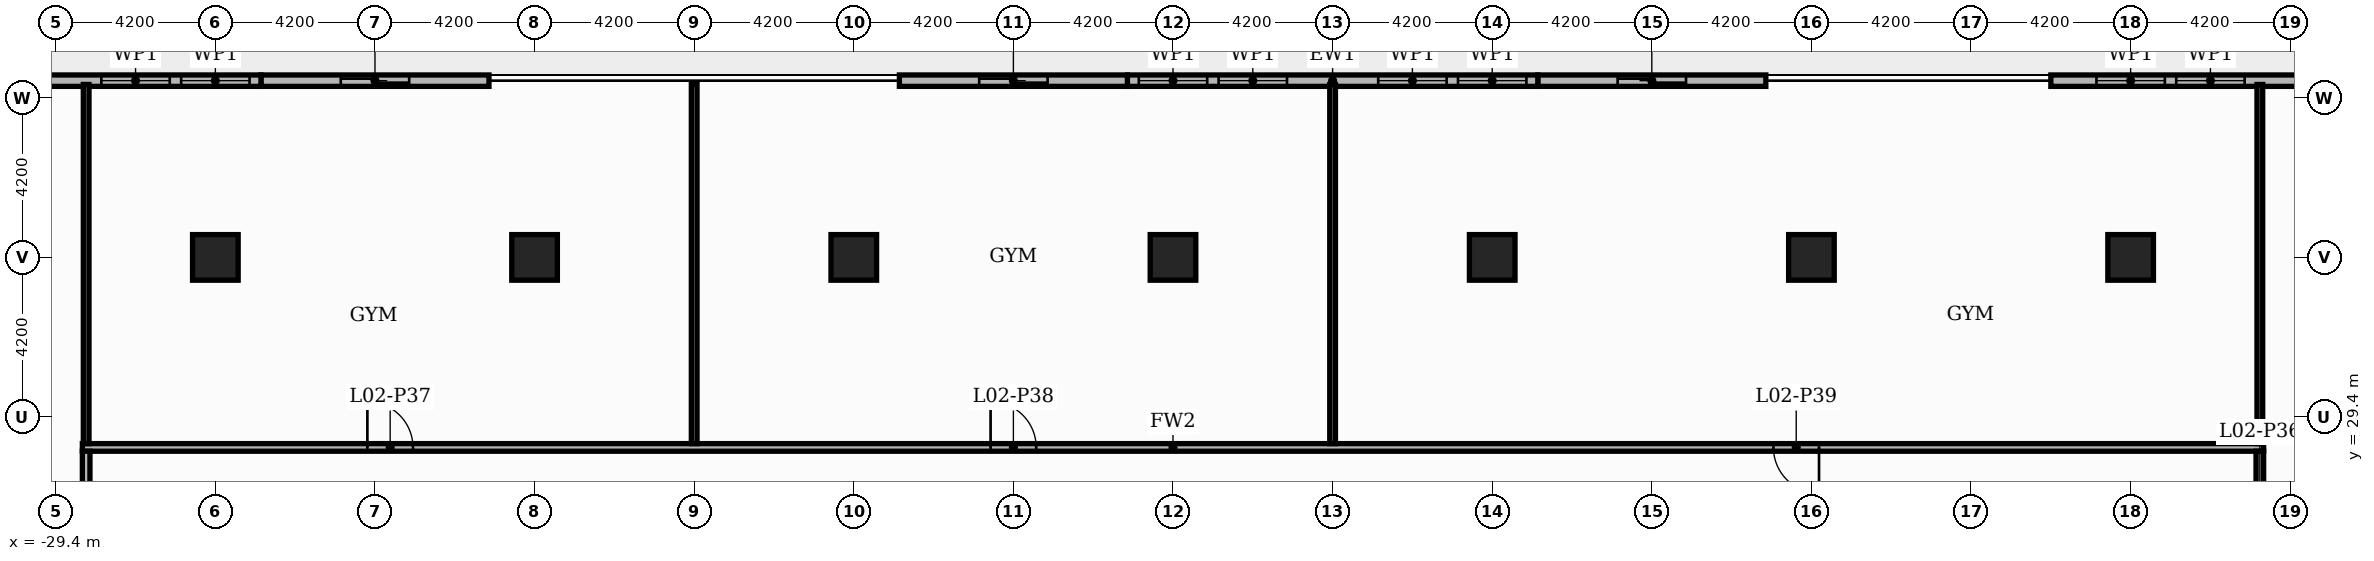
"""IFC4 building model, lengths in metres.
Left out: names, types, materials, properties, quantities, classifications, styles, units other than length and angle.
Written with IfcOpenShell. Run it as: python <this file> out.ifc"""

import sys

from ifc_helpers import new_model, si_unit, direction, frame, frame_2d, origin, origin_2d, place, context, subcontext, project, spatial, rectangle, extrude, element, fill, save


model = new_model("IFC4")
c1 = context("Model", 3, precision=1e-05, world=origin(), true_north=direction((0.0, 1.0)))
c2 = subcontext(c1, "Body", "Model", "MODEL_VIEW")
j1 = project(units=[si_unit("LENGTHUNIT", "METRE"), si_unit("PLANEANGLEUNIT", "RADIAN")], contexts=[c1])
p1 = place(None, origin())
s1 = spatial("IfcSite", under=j1, at=p1, CompositionType="ELEMENT")
p2 = place(p1, origin())
s2 = spatial("IfcBuilding", under=s1, at=p2, CompositionType="ELEMENT")
p3 = place(p2, frame((0.0, 0.0, 12.0)))
s3 = spatial("IfcBuildingStorey", under=s2, at=p3, CompositionType="ELEMENT", Elevation=12.0)
for number, where, z_axis, x_axis in (
    (1, (0.0, 33.6, 0.0), (0.0, 0.0, 1.0), (1.0, 0.0, 0.0)),
    (2, (8.4, 33.6, 0.0), (0.0, 0.0, 1.0), (1.0, 0.0, 0.0)),
    (3, (16.8, 33.6, 0.0), (0.0, 0.0, 1.0), (1.0, 0.0, 0.0)),
    (4, (25.2, 33.6, 0.0), (0.0, 0.0, 1.0), (1.0, 0.0, 0.0)),
    (5, (-8.4, 33.6, 0.0), (0.0, 0.0, 1.0), (1.0, 0.0, 0.0)),
    (6, (-16.8, 33.6, 0.0), (0.0, 0.0, 1.0), (1.0, 0.0, 0.0)),
    (7, (-25.2, 33.6, 0.0), (0.0, 0.0, 1.0), (1.0, 0.0, 0.0)),
):
    element("IfcColumn", number, at=place(p3, frame(where, z_axis=z_axis, x_axis=x_axis)), inside=s3, PredefinedType="COLUMN", context=c2, shape_type="SweptSolid", body=[
        extrude(rectangle(XDim=1.2, YDim=1.2, at=origin_2d()), origin(), (0.0, 0.0, 1.0), 4.8),
    ])
p4 = place(p3, frame((30.6, 38.25, 0.0), z_axis=(0.0, 0.0, 1.0), x_axis=(-1.0, 0.0, 0.0)))
e8 = element("IfcWall", 8, at=p4, inside=s3, PredefinedType="STANDARD", context=c2, shape_type="SweptSolid", body=[
    extrude(rectangle(XDim=7.5, YDim=0.3, at=frame_2d((3.75, 0.0))), origin(), (0.0, 0.0, 1.0), 4.38),
])
p5 = place(p4, frame((2.4, 0.0, 0.6)))
e9 = element("IfcOpeningElement", 9, at=p5, cuts=e8, PredefinedType="OPENING", context=c2, shape_type="SweptSolid", body=[
    extrude(rectangle(XDim=1.8, YDim=3.0, at=frame_2d((0.9, 1.5))), frame((0.0, 0.16, 0.0), z_axis=(0.0, -1.0, 0.0), x_axis=(1.0, 0.0, 0.0)), (0.0, 0.0, 1.0), 0.32),
])
p6 = place(p4, frame((4.5, 0.0, 0.6)))
e10 = element("IfcOpeningElement", 10, at=p6, cuts=e8, PredefinedType="OPENING", context=c2, shape_type="SweptSolid", body=[
    extrude(rectangle(XDim=1.8, YDim=3.0, at=frame_2d((0.9, 1.5))), frame((0.0, 0.16, 0.0), z_axis=(0.0, -1.0, 0.0), x_axis=(1.0, 0.0, 0.0)), (0.0, 0.0, 1.0), 0.32),
])
p7 = place(p3, frame((15.6, 38.25, 0.0), z_axis=(0.0, 0.0, 1.0), x_axis=(-1.0, 0.0, 0.0)))
e11 = element("IfcWall", 11, at=p7, inside=s3, PredefinedType="STANDARD", context=c2, shape_type="SweptSolid", body=[
    extrude(rectangle(XDim=6.0, YDim=0.3, at=frame_2d((3.0, 0.0))), origin(), (0.0, 0.0, 1.0), 4.38),
])
p8 = place(p7, frame((2.1, 0.0, 0.0)))
e12 = element("IfcOpeningElement", 12, at=p8, cuts=e11, PredefinedType="OPENING", context=c2, shape_type="SweptSolid", body=[
    extrude(rectangle(XDim=1.8, YDim=2.4, at=frame_2d((0.9, 1.2))), frame((0.0, 0.16, 0.0), z_axis=(0.0, -1.0, 0.0), x_axis=(1.0, 0.0, 0.0)), (0.0, 0.0, 1.0), 0.32),
])
p9 = place(p3, frame((9.6, 38.25, 0.0), z_axis=(0.0, 0.0, 1.0), x_axis=(-1.0, 0.0, 0.0)))
e13 = element("IfcWall", 13, at=p9, inside=s3, PredefinedType="STANDARD", context=c2, shape_type="SweptSolid", body=[
    extrude(rectangle(XDim=10.8, YDim=0.3, at=frame_2d((5.4, 0.0))), origin(), (0.0, 0.0, 1.0), 4.38),
])
p10 = place(p9, frame((0.3, 0.0, 0.6)))
e14 = element("IfcOpeningElement", 14, at=p10, cuts=e13, PredefinedType="OPENING", context=c2, shape_type="SweptSolid", body=[
    extrude(rectangle(XDim=1.8, YDim=3.0, at=frame_2d((0.9, 1.5))), frame((0.0, 0.16, 0.0), z_axis=(0.0, -1.0, 0.0), x_axis=(1.0, 0.0, 0.0)), (0.0, 0.0, 1.0), 0.32),
])
p11 = place(p9, frame((2.4, 0.0, 0.6)))
e15 = element("IfcOpeningElement", 15, at=p11, cuts=e13, PredefinedType="OPENING", context=c2, shape_type="SweptSolid", body=[
    extrude(rectangle(XDim=1.8, YDim=3.0, at=frame_2d((0.9, 1.5))), frame((0.0, 0.16, 0.0), z_axis=(0.0, -1.0, 0.0), x_axis=(1.0, 0.0, 0.0)), (0.0, 0.0, 1.0), 0.32),
])
p12 = place(p9, frame((6.6, 0.0, 0.6)))
e16 = element("IfcOpeningElement", 16, at=p12, cuts=e13, PredefinedType="OPENING", context=c2, shape_type="SweptSolid", body=[
    extrude(rectangle(XDim=1.8, YDim=3.0, at=frame_2d((0.9, 1.5))), frame((0.0, 0.16, 0.0), z_axis=(0.0, -1.0, 0.0), x_axis=(1.0, 0.0, 0.0)), (0.0, 0.0, 1.0), 0.32),
])
p13 = place(p9, frame((8.7, 0.0, 0.6)))
e17 = element("IfcOpeningElement", 17, at=p13, cuts=e13, PredefinedType="OPENING", context=c2, shape_type="SweptSolid", body=[
    extrude(rectangle(XDim=1.8, YDim=3.0, at=frame_2d((0.9, 1.5))), frame((0.0, 0.16, 0.0), z_axis=(0.0, -1.0, 0.0), x_axis=(1.0, 0.0, 0.0)), (0.0, 0.0, 1.0), 0.32),
])
p14 = place(p3, frame((-1.2, 38.25, 0.0), z_axis=(0.0, 0.0, 1.0), x_axis=(-1.0, 0.0, 0.0)))
e18 = element("IfcWall", 18, at=p14, inside=s3, PredefinedType="STANDARD", context=c2, shape_type="SweptSolid", body=[
    extrude(rectangle(XDim=6.0, YDim=0.3, at=frame_2d((3.0, 0.0))), origin(), (0.0, 0.0, 1.0), 4.38),
])
p15 = place(p14, frame((2.1, 0.0, 0.0)))
e19 = element("IfcOpeningElement", 19, at=p15, cuts=e18, PredefinedType="OPENING", context=c2, shape_type="SweptSolid", body=[
    extrude(rectangle(XDim=1.8, YDim=2.4, at=frame_2d((0.9, 1.2))), frame((0.0, 0.16, 0.0), z_axis=(0.0, -1.0, 0.0), x_axis=(1.0, 0.0, 0.0)), (0.0, 0.0, 1.0), 0.32),
])
p16 = place(p3, frame((-18.0, 38.25, 0.0), z_axis=(0.0, 0.0, 1.0), x_axis=(-1.0, 0.0, 0.0)))
e20 = element("IfcWall", 20, at=p16, inside=s3, PredefinedType="STANDARD", context=c2, shape_type="SweptSolid", body=[
    extrude(rectangle(XDim=6.0, YDim=0.3, at=frame_2d((3.0, 0.0))), origin(), (0.0, 0.0, 1.0), 4.38),
])
p17 = place(p16, frame((2.1, 0.0, 0.0)))
e21 = element("IfcOpeningElement", 21, at=p17, cuts=e20, PredefinedType="OPENING", context=c2, shape_type="SweptSolid", body=[
    extrude(rectangle(XDim=1.8, YDim=2.4, at=frame_2d((0.9, 1.2))), frame((0.0, 0.16, 0.0), z_axis=(0.0, -1.0, 0.0), x_axis=(1.0, 0.0, 0.0)), (0.0, 0.0, 1.0), 0.32),
])
p18 = place(p3, frame((-24.0, 38.25, 0.0), z_axis=(0.0, 0.0, 1.0), x_axis=(-1.0, 0.0, 0.0)))
e22 = element("IfcWall", 22, at=p18, inside=s3, PredefinedType="STANDARD", context=c2, shape_type="SweptSolid", body=[
    extrude(rectangle(XDim=7.2, YDim=0.3, at=frame_2d((3.6, 0.0))), origin(), (0.0, 0.0, 1.0), 4.38),
])
p19 = place(p18, frame((0.3, 0.0, 0.6)))
e23 = element("IfcOpeningElement", 23, at=p19, cuts=e22, PredefinedType="OPENING", context=c2, shape_type="SweptSolid", body=[
    extrude(rectangle(XDim=1.8, YDim=3.0, at=frame_2d((0.9, 1.5))), frame((0.0, 0.16, 0.0), z_axis=(0.0, -1.0, 0.0), x_axis=(1.0, 0.0, 0.0)), (0.0, 0.0, 1.0), 0.32),
])
p20 = place(p18, frame((2.4, 0.0, 0.6)))
e24 = element("IfcOpeningElement", 24, at=p20, cuts=e22, PredefinedType="OPENING", context=c2, shape_type="SweptSolid", body=[
    extrude(rectangle(XDim=1.8, YDim=3.0, at=frame_2d((0.9, 1.5))), frame((0.0, 0.16, 0.0), z_axis=(0.0, -1.0, 0.0), x_axis=(1.0, 0.0, 0.0)), (0.0, 0.0, 1.0), 0.32),
])
p21 = place(p3, frame((-28.7, 28.6, 0.0), z_axis=(0.0, 0.0, 1.0), x_axis=(1.0, 0.0, 0.0)))
e25 = element("IfcWall", 25, at=p21, inside=s3, PredefinedType="PARTITIONING", context=c2, shape_type="SweptSolid", body=[
    extrude(rectangle(XDim=57.4, YDim=0.2, at=frame_2d((28.7, 0.0))), origin(), (0.0, 0.0, 1.0), 4.08),
])
p22 = place(p21, frame((7.5, 0.0, 0.0)))
e26 = element("IfcOpeningElement", 26, at=p22, cuts=e25, PredefinedType="OPENING", context=c2, shape_type="SweptSolid", body=[
    extrude(rectangle(XDim=1.2, YDim=2.2, at=frame_2d((0.6, 1.1))), frame((0.0, 0.11, 0.0), z_axis=(0.0, -1.0, 0.0), x_axis=(1.0, 0.0, 0.0)), (0.0, 0.0, 1.0), 0.22),
])
p23 = place(p21, frame((23.9, 0.0, 0.0)))
e27 = element("IfcOpeningElement", 27, at=p23, cuts=e25, PredefinedType="OPENING", context=c2, shape_type="SweptSolid", body=[
    extrude(rectangle(XDim=1.2, YDim=2.2, at=frame_2d((0.6, 1.1))), frame((0.0, 0.11, 0.0), z_axis=(0.0, -1.0, 0.0), x_axis=(1.0, 0.0, 0.0)), (0.0, 0.0, 1.0), 0.22),
])
p24 = place(p21, frame((44.5, 0.0, 0.0)))
e28 = element("IfcOpeningElement", 28, at=p24, cuts=e25, PredefinedType="OPENING", context=c2, shape_type="SweptSolid", body=[
    extrude(rectangle(XDim=1.2, YDim=2.2, at=frame_2d((0.6, 1.1))), frame((0.0, 0.11, 0.0), z_axis=(0.0, -1.0, 0.0), x_axis=(1.0, 0.0, 0.0)), (0.0, 0.0, 1.0), 0.22),
])
p25 = place(p3, frame((-28.6, -28.5, 0.0), z_axis=(0.0, 0.0, 1.0), x_axis=(0.0, 1.0, 0.0)))
e29 = element("IfcWall", 29, at=p25, inside=s3, PredefinedType="PARTITIONING", context=c2, shape_type="SweptSolid", body=[
    extrude(rectangle(XDim=57.0, YDim=0.2, at=frame_2d((28.5, 0.0))), origin(), (0.0, 0.0, 1.0), 4.18),
])
p26 = place(p25, frame((9.4, 0.0, 0.0)))
e30 = element("IfcOpeningElement", 30, at=p26, cuts=e29, PredefinedType="OPENING", context=c2, shape_type="SweptSolid", body=[
    extrude(rectangle(XDim=1.2, YDim=2.2, at=frame_2d((0.6, 1.1))), frame((0.0, 0.11, 0.0), z_axis=(0.0, -1.0, 0.0), x_axis=(1.0, 0.0, 0.0)), (0.0, 0.0, 1.0), 0.22),
])
p27 = place(p25, frame((27.9, 0.0, 0.0)))
e31 = element("IfcOpeningElement", 31, at=p27, cuts=e29, PredefinedType="OPENING", context=c2, shape_type="SweptSolid", body=[
    extrude(rectangle(XDim=1.2, YDim=2.2, at=frame_2d((0.6, 1.1))), frame((0.0, 0.11, 0.0), z_axis=(0.0, -1.0, 0.0), x_axis=(1.0, 0.0, 0.0)), (0.0, 0.0, 1.0), 0.22),
])
p28 = place(p25, frame((46.4, 0.0, 0.0)))
e32 = element("IfcOpeningElement", 32, at=p28, cuts=e29, PredefinedType="OPENING", context=c2, shape_type="SweptSolid", body=[
    extrude(rectangle(XDim=1.2, YDim=2.2, at=frame_2d((0.6, 1.1))), frame((0.0, 0.11, 0.0), z_axis=(0.0, -1.0, 0.0), x_axis=(1.0, 0.0, 0.0)), (0.0, 0.0, 1.0), 0.22),
])
for number, where, z_axis, x_axis in (
    (33, (-28.6, 28.7, 0.0), (0.0, 0.0, 1.0), (0.0, 1.0, 0.0)),
    (34, (-12.6, 28.7, 0.0), (0.0, 0.0, 1.0), (0.0, 1.0, 0.0)),
    (35, (4.2, 28.7, 0.0), (0.0, 0.0, 1.0), (0.0, 1.0, 0.0)),
):
    element("IfcWall", number, at=place(p3, frame(where, z_axis=z_axis, x_axis=x_axis)), inside=s3, PredefinedType="PARTITIONING", context=c2, shape_type="SweptSolid", body=[
        extrude(rectangle(XDim=9.45, YDim=0.15, at=frame_2d((4.725, 0.0))), origin(), (0.0, 0.0, 1.0), 4.18),
    ])
p29 = place(p3, frame((28.6, -28.5, 0.0), z_axis=(0.0, 0.0, 1.0), x_axis=(0.0, 1.0, 0.0)))
e36 = element("IfcWall", 36, at=p29, inside=s3, PredefinedType="PARTITIONING", context=c2, shape_type="SweptSolid", body=[
    extrude(rectangle(XDim=57.0, YDim=0.2, at=frame_2d((28.5, 0.0))), origin(), (0.0, 0.0, 1.0), 4.18),
])
p30 = place(p29, frame((7.3, 0.0, 0.0)))
e37 = element("IfcOpeningElement", 37, at=p30, cuts=e36, PredefinedType="OPENING", context=c2, shape_type="SweptSolid", body=[
    extrude(rectangle(XDim=1.2, YDim=2.2, at=frame_2d((0.6, 1.1))), frame((0.0, 0.11, 0.0), z_axis=(0.0, -1.0, 0.0), x_axis=(1.0, 0.0, 0.0)), (0.0, 0.0, 1.0), 0.22),
])
p31 = place(p29, frame((21.6, 0.0, 0.0)))
e38 = element("IfcOpeningElement", 38, at=p31, cuts=e36, PredefinedType="OPENING", context=c2, shape_type="SweptSolid", body=[
    extrude(rectangle(XDim=1.2, YDim=2.2, at=frame_2d((0.6, 1.1))), frame((0.0, 0.11, 0.0), z_axis=(0.0, -1.0, 0.0), x_axis=(1.0, 0.0, 0.0)), (0.0, 0.0, 1.0), 0.22),
])
p32 = place(p29, frame((34.2, 0.0, 0.0)))
e39 = element("IfcOpeningElement", 39, at=p32, cuts=e36, PredefinedType="OPENING", context=c2, shape_type="SweptSolid", body=[
    extrude(rectangle(XDim=1.2, YDim=2.2, at=frame_2d((0.6, 1.1))), frame((0.0, 0.11, 0.0), z_axis=(0.0, -1.0, 0.0), x_axis=(1.0, 0.0, 0.0)), (0.0, 0.0, 1.0), 0.22),
])
p33 = place(p29, frame((46.8, 0.0, 0.0)))
e40 = element("IfcOpeningElement", 40, at=p33, cuts=e36, PredefinedType="OPENING", context=c2, shape_type="SweptSolid", body=[
    extrude(rectangle(XDim=1.2, YDim=2.2, at=frame_2d((0.6, 1.1))), frame((0.0, 0.11, 0.0), z_axis=(0.0, -1.0, 0.0), x_axis=(1.0, 0.0, 0.0)), (0.0, 0.0, 1.0), 0.22),
])
p34 = place(p29, frame((54.8, 0.0, 0.0)))
e41 = element("IfcOpeningElement", 41, at=p34, cuts=e36, PredefinedType="OPENING", context=c2, shape_type="SweptSolid", body=[
    extrude(rectangle(XDim=1.2, YDim=2.2, at=frame_2d((0.6, 1.1))), frame((0.0, 0.11, 0.0), z_axis=(0.0, -1.0, 0.0), x_axis=(1.0, 0.0, 0.0)), (0.0, 0.0, 1.0), 0.22),
])
p35 = place(p3, frame((28.6, 28.7, 0.0), z_axis=(0.0, 0.0, 1.0), x_axis=(0.0, 1.0, 0.0)))
e42 = element("IfcWall", 42, at=p35, inside=s3, PredefinedType="PARTITIONING", context=c2, shape_type="SweptSolid", body=[
    extrude(rectangle(XDim=9.45, YDim=0.15, at=frame_2d((4.725, 0.0))), origin(), (0.0, 0.0, 1.0), 4.18),
])
p36 = place(p5, origin())
e43 = element("IfcWindow", 43, at=p36, inside=s3, PartitioningType="SINGLE_PANEL", PredefinedType="WINDOW", context=c2, shape_type="SweptSolid", body=[
    extrude(rectangle(XDim=1.8, YDim=3.0, at=frame_2d((0.9, 1.5))), frame((0.0, 0.03, 0.0), z_axis=(0.0, -1.0, 0.0), x_axis=(1.0, 0.0, 0.0)), (0.0, 0.0, 1.0), 0.06),
])
fill(e9, e43)
p37 = place(p6, origin())
e44 = element("IfcWindow", 44, at=p37, inside=s3, PartitioningType="SINGLE_PANEL", PredefinedType="WINDOW", context=c2, shape_type="SweptSolid", body=[
    extrude(rectangle(XDim=1.8, YDim=3.0, at=frame_2d((0.9, 1.5))), frame((0.0, 0.03, 0.0), z_axis=(0.0, -1.0, 0.0), x_axis=(1.0, 0.0, 0.0)), (0.0, 0.0, 1.0), 0.06),
])
fill(e10, e44)
p38 = place(p8, origin())
e45 = element("IfcDoor", 45, at=p38, inside=s3, OperationType="SLIDING_TO_RIGHT", PredefinedType="DOOR", context=c2, shape_type="SweptSolid", body=[
    extrude(rectangle(XDim=1.8, YDim=2.4, at=frame_2d((0.9, 1.2))), frame((0.0, 0.025, 0.0), z_axis=(0.0, -1.0, 0.0), x_axis=(1.0, 0.0, 0.0)), (0.0, 0.0, 1.0), 0.05),
])
fill(e12, e45)
p39 = place(p10, origin())
e46 = element("IfcWindow", 46, at=p39, inside=s3, PartitioningType="SINGLE_PANEL", PredefinedType="WINDOW", context=c2, shape_type="SweptSolid", body=[
    extrude(rectangle(XDim=1.8, YDim=3.0, at=frame_2d((0.9, 1.5))), frame((0.0, 0.03, 0.0), z_axis=(0.0, -1.0, 0.0), x_axis=(1.0, 0.0, 0.0)), (0.0, 0.0, 1.0), 0.06),
])
fill(e14, e46)
p40 = place(p11, origin())
e47 = element("IfcWindow", 47, at=p40, inside=s3, PartitioningType="SINGLE_PANEL", PredefinedType="WINDOW", context=c2, shape_type="SweptSolid", body=[
    extrude(rectangle(XDim=1.8, YDim=3.0, at=frame_2d((0.9, 1.5))), frame((0.0, 0.03, 0.0), z_axis=(0.0, -1.0, 0.0), x_axis=(1.0, 0.0, 0.0)), (0.0, 0.0, 1.0), 0.06),
])
fill(e15, e47)
p41 = place(p12, origin())
e48 = element("IfcWindow", 48, at=p41, inside=s3, PartitioningType="SINGLE_PANEL", PredefinedType="WINDOW", context=c2, shape_type="SweptSolid", body=[
    extrude(rectangle(XDim=1.8, YDim=3.0, at=frame_2d((0.9, 1.5))), frame((0.0, 0.03, 0.0), z_axis=(0.0, -1.0, 0.0), x_axis=(1.0, 0.0, 0.0)), (0.0, 0.0, 1.0), 0.06),
])
fill(e16, e48)
p42 = place(p13, origin())
e49 = element("IfcWindow", 49, at=p42, inside=s3, PartitioningType="SINGLE_PANEL", PredefinedType="WINDOW", context=c2, shape_type="SweptSolid", body=[
    extrude(rectangle(XDim=1.8, YDim=3.0, at=frame_2d((0.9, 1.5))), frame((0.0, 0.03, 0.0), z_axis=(0.0, -1.0, 0.0), x_axis=(1.0, 0.0, 0.0)), (0.0, 0.0, 1.0), 0.06),
])
fill(e17, e49)
p43 = place(p15, origin())
e50 = element("IfcDoor", 50, at=p43, inside=s3, OperationType="SLIDING_TO_LEFT", PredefinedType="DOOR", context=c2, shape_type="SweptSolid", body=[
    extrude(rectangle(XDim=1.8, YDim=2.4, at=frame_2d((0.9, 1.2))), frame((0.0, 0.025, 0.0), z_axis=(0.0, -1.0, 0.0), x_axis=(1.0, 0.0, 0.0)), (0.0, 0.0, 1.0), 0.05),
])
fill(e19, e50)
p44 = place(p17, origin())
e51 = element("IfcDoor", 51, at=p44, inside=s3, OperationType="SLIDING_TO_LEFT", PredefinedType="DOOR", context=c2, shape_type="SweptSolid", body=[
    extrude(rectangle(XDim=1.8, YDim=2.4, at=frame_2d((0.9, 1.2))), frame((0.0, 0.025, 0.0), z_axis=(0.0, -1.0, 0.0), x_axis=(1.0, 0.0, 0.0)), (0.0, 0.0, 1.0), 0.05),
])
fill(e21, e51)
p45 = place(p19, origin())
e52 = element("IfcWindow", 52, at=p45, inside=s3, PartitioningType="SINGLE_PANEL", PredefinedType="WINDOW", context=c2, shape_type="SweptSolid", body=[
    extrude(rectangle(XDim=1.8, YDim=3.0, at=frame_2d((0.9, 1.5))), frame((0.0, 0.03, 0.0), z_axis=(0.0, -1.0, 0.0), x_axis=(1.0, 0.0, 0.0)), (0.0, 0.0, 1.0), 0.06),
])
fill(e23, e52)
p46 = place(p20, origin())
e53 = element("IfcWindow", 53, at=p46, inside=s3, PartitioningType="SINGLE_PANEL", PredefinedType="WINDOW", context=c2, shape_type="SweptSolid", body=[
    extrude(rectangle(XDim=1.8, YDim=3.0, at=frame_2d((0.9, 1.5))), frame((0.0, 0.03, 0.0), z_axis=(0.0, -1.0, 0.0), x_axis=(1.0, 0.0, 0.0)), (0.0, 0.0, 1.0), 0.06),
])
fill(e24, e53)
p47 = place(p22, origin())
e54 = element("IfcDoor", 54, at=p47, inside=s3, OperationType="SINGLE_SWING_LEFT", PredefinedType="DOOR", context=c2, shape_type="SweptSolid", body=[
    extrude(rectangle(XDim=1.2, YDim=2.2, at=frame_2d((0.6, 1.1))), frame((0.0, 0.025, 0.0), z_axis=(0.0, -1.0, 0.0), x_axis=(1.0, 0.0, 0.0)), (0.0, 0.0, 1.0), 0.05),
])
fill(e26, e54)
p48 = place(p23, origin())
e55 = element("IfcDoor", 55, at=p48, inside=s3, OperationType="SINGLE_SWING_LEFT", PredefinedType="DOOR", context=c2, shape_type="SweptSolid", body=[
    extrude(rectangle(XDim=1.2, YDim=2.2, at=frame_2d((0.6, 1.1))), frame((0.0, 0.025, 0.0), z_axis=(0.0, -1.0, 0.0), x_axis=(1.0, 0.0, 0.0)), (0.0, 0.0, 1.0), 0.05),
])
fill(e27, e55)
p49 = place(p24, origin())
e56 = element("IfcDoor", 56, at=p49, inside=s3, OperationType="SINGLE_SWING_RIGHT", PredefinedType="DOOR", context=c2, shape_type="SweptSolid", body=[
    extrude(rectangle(XDim=1.2, YDim=2.2, at=frame_2d((0.6, 1.1))), frame((0.0, 0.025, 0.0), z_axis=(0.0, -1.0, 0.0), x_axis=(1.0, 0.0, 0.0)), (0.0, 0.0, 1.0), 0.05),
])
fill(e28, e56)
save(model, sys.argv[1])
